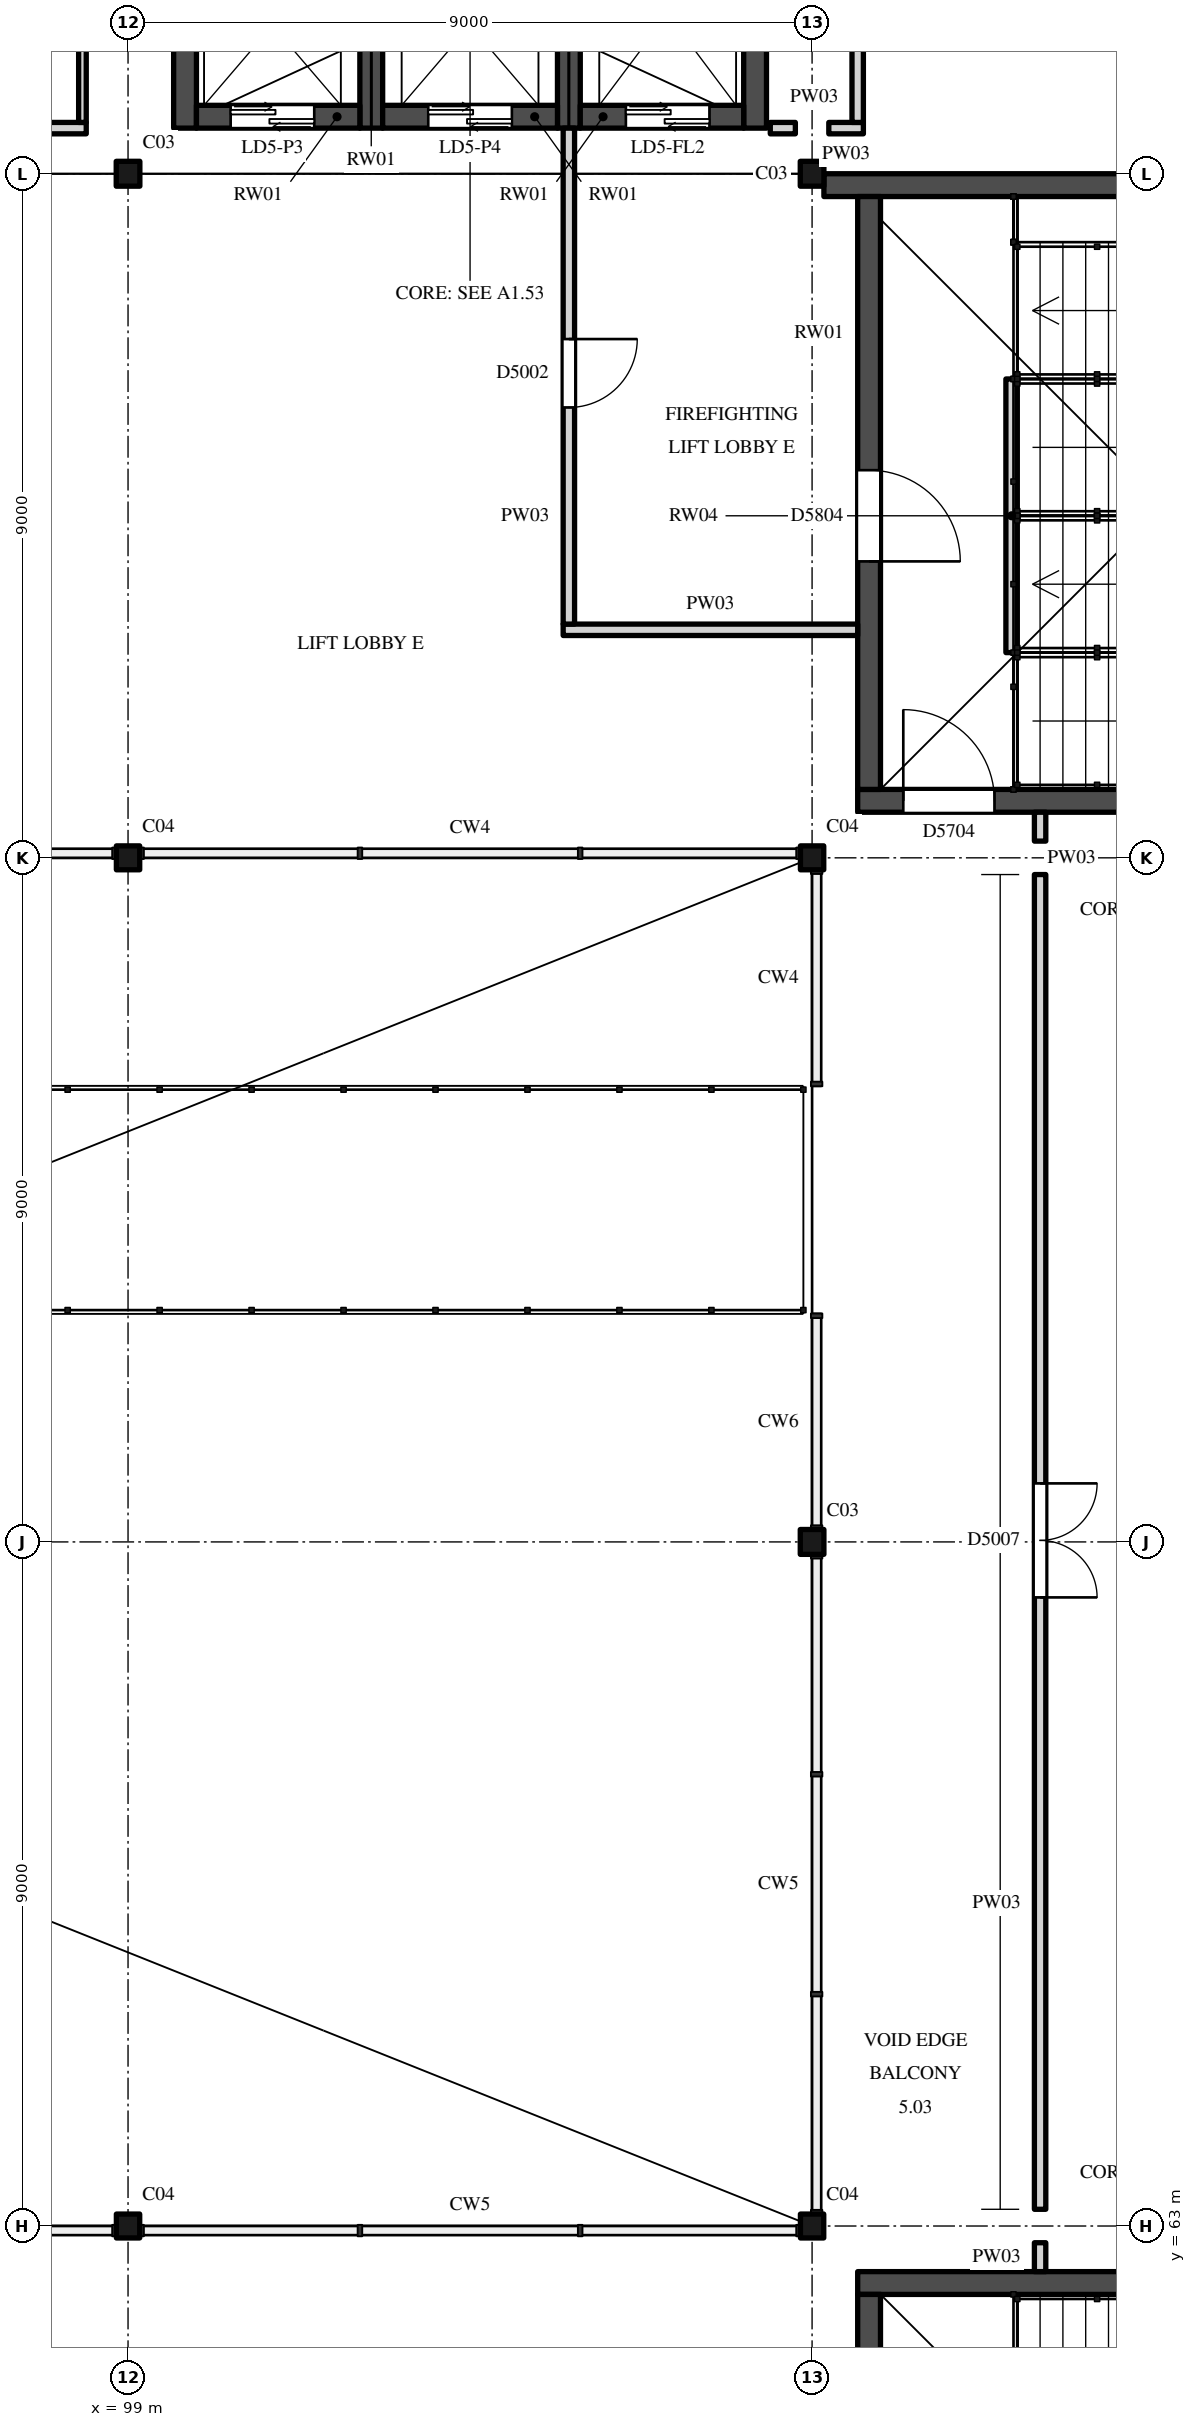
"""IFC4 building model, lengths in metres.
Left out: names, types, materials, properties, quantities, classifications, styles, units other than length and angle.
Written with IfcOpenShell. Run it as: python <this file> out.ifc"""

import sys

from ifc_helpers import new_model, si_unit, direction, frame, frame_2d, origin, origin_2d, place, context, subcontext, project, spatial, rectangle, i_section, extrude, element, fill, save


model = new_model("IFC4")
c1 = context("Model", 3, precision=1e-05, world=origin(), true_north=direction((0.0, 1.0)))
c2 = subcontext(c1, "Body", "Model", "MODEL_VIEW")
j1 = project(units=[si_unit("LENGTHUNIT", "METRE"), si_unit("PLANEANGLEUNIT", "RADIAN")], contexts=[c1])
p1 = place(None, origin())
s1 = spatial("IfcSite", under=j1, at=p1, CompositionType="ELEMENT")
p2 = place(p1, origin())
s2 = spatial("IfcBuilding", under=s1, at=p2, CompositionType="ELEMENT")
p3 = place(p2, frame((0.0, 0.0, 31.0)))
s3 = spatial("IfcBuildingStorey", under=s2, at=p3, CompositionType="ELEMENT", Elevation=31.0)
for number, where, z_axis, x_axis in (
    (1, (99.0, 63.0, 0.0), (0.0, 0.0, 1.0), (1.0, 0.0, 0.0)),
    (2, (108.0, 63.0, 0.0), (0.0, 0.0, 1.0), (1.0, 0.0, 0.0)),
):
    element("IfcColumn", number, at=place(p3, frame(where, z_axis=z_axis, x_axis=x_axis)), inside=s3, PredefinedType="COLUMN", context=c2, shape_type="SweptSolid", body=[
        extrude(i_section(OverallWidth=0.307, OverallDepth=0.315, WebThickness=0.012, FlangeThickness=0.019, FilletRadius=0.017, at=origin_2d()), origin(), (0.0, 0.0, 1.0), 5.0),
    ])
p4 = place(p3, frame((108.0, 72.0, 0.0), z_axis=(0.0, 0.0, 1.0), x_axis=(1.0, 0.0, 0.0)))
e3 = element("IfcColumn", 3, at=p4, inside=s3, PredefinedType="COLUMN", context=c2, shape_type="SweptSolid", body=[
    extrude(i_section(OverallWidth=0.311, OverallDepth=0.327, WebThickness=0.016, FlangeThickness=0.025, FilletRadius=0.017, at=origin_2d()), origin(), (0.0, 0.0, 1.0), 5.0),
])
for number, where, z_axis, x_axis in (
    (4, (99.0, 81.0, 0.0), (0.0, 0.0, 1.0), (1.0, 0.0, 0.0)),
    (5, (108.0, 81.0, 0.0), (0.0, 0.0, 1.0), (1.0, 0.0, 0.0)),
):
    element("IfcColumn", number, at=place(p3, frame(where, z_axis=z_axis, x_axis=x_axis)), inside=s3, PredefinedType="COLUMN", context=c2, shape_type="SweptSolid", body=[
        extrude(i_section(OverallWidth=0.307, OverallDepth=0.315, WebThickness=0.012, FlangeThickness=0.019, FilletRadius=0.017, at=origin_2d()), origin(), (0.0, 0.0, 1.0), 5.0),
    ])
for number, where, z_axis, x_axis in (
    (6, (99.0, 90.0, 0.0), (0.0, 0.0, 1.0), (1.0, 0.0, 0.0)),
    (7, (108.0, 90.0, 0.0), (0.0, 0.0, 1.0), (1.0, 0.0, 0.0)),
):
    element("IfcColumn", number, at=place(p3, frame(where, z_axis=z_axis, x_axis=x_axis)), inside=s3, PredefinedType="COLUMN", context=c2, shape_type="SweptSolid", body=[
        extrude(i_section(OverallWidth=0.311, OverallDepth=0.327, WebThickness=0.016, FlangeThickness=0.025, FilletRadius=0.017, at=origin_2d()), origin(), (0.0, 0.0, 1.0), 5.0),
    ])
p5 = place(p3, frame((108.6, 62.25, 0.0), z_axis=(0.0, 0.0, 1.0), x_axis=(1.0, 0.0, 0.0)))
e8 = element("IfcWall", 8, at=p5, inside=s3, PredefinedType="SHEAR", context=c2, shape_type="SweptSolid", body=[
    extrude(rectangle(XDim=8.1, YDim=0.3, at=frame_2d((4.05, 0.0))), origin(), (0.0, 0.0, 1.0), 5.0),
])
p6 = place(p3, frame((108.75, 54.3, 0.0), z_axis=(0.0, 0.0, 1.0), x_axis=(0.0, 1.0, 0.0)))
e9 = element("IfcWall", 9, at=p6, inside=s3, PredefinedType="SHEAR", context=c2, shape_type="SweptSolid", body=[
    extrude(rectangle(XDim=7.8, YDim=0.3, at=frame_2d((3.9, 0.0))), origin(), (0.0, 0.0, 1.0), 5.0),
])
p7 = place(p6, frame((3.6, 0.0, 0.0)))
e10 = element("IfcOpeningElement", 10, at=p7, cuts=e9, PredefinedType="OPENING", context=c2, shape_type="SweptSolid", body=[
    extrude(rectangle(XDim=1.2, YDim=2.1, at=frame_2d((0.6, 1.05))), frame((0.0, 0.16, 0.0), z_axis=(0.0, -1.0, 0.0), x_axis=(1.0, 0.0, 0.0)), (0.0, 0.0, 1.0), 0.32),
])
p8 = place(p3, frame((108.6, 81.75, 0.0), z_axis=(0.0, 0.0, 1.0), x_axis=(1.0, 0.0, 0.0)))
e11 = element("IfcWall", 11, at=p8, inside=s3, PredefinedType="SHEAR", context=c2, shape_type="SweptSolid", body=[
    extrude(rectangle(XDim=8.1, YDim=0.3, at=frame_2d((4.05, 0.0))), origin(), (0.0, 0.0, 1.0), 5.0),
])
p9 = place(p8, frame((0.6, 0.0, 0.0)))
e12 = element("IfcOpeningElement", 12, at=p9, cuts=e11, PredefinedType="OPENING", context=c2, shape_type="SweptSolid", body=[
    extrude(rectangle(XDim=1.2, YDim=2.1, at=frame_2d((0.6, 1.05))), frame((0.0, 0.16, 0.0), z_axis=(0.0, -1.0, 0.0), x_axis=(1.0, 0.0, 0.0)), (0.0, 0.0, 1.0), 0.32),
])
p10 = place(p3, frame((108.156, 89.85, 0.0), z_axis=(0.0, 0.0, 1.0), x_axis=(1.0, 0.0, 0.0)))
e13 = element("IfcWall", 13, at=p10, inside=s3, PredefinedType="SHEAR", context=c2, shape_type="SweptSolid", body=[
    extrude(rectangle(XDim=8.544, YDim=0.3, at=frame_2d((4.272, 0.0))), origin(), (0.0, 0.0, 1.0), 5.0),
])
p11 = place(p3, frame((108.75, 81.9, 0.0), z_axis=(0.0, 0.0, 1.0), x_axis=(0.0, 1.0, 0.0)))
e14 = element("IfcWall", 14, at=p11, inside=s3, PredefinedType="SHEAR", context=c2, shape_type="SweptSolid", body=[
    extrude(rectangle(XDim=7.8, YDim=0.3, at=frame_2d((3.9, 0.0))), origin(), (0.0, 0.0, 1.0), 5.0),
])
p12 = place(p11, frame((3.0, 0.0, 0.0)))
e15 = element("IfcOpeningElement", 15, at=p12, cuts=e14, PredefinedType="OPENING", context=c2, shape_type="SweptSolid", body=[
    extrude(rectangle(XDim=1.2, YDim=2.1, at=frame_2d((0.6, 1.05))), frame((0.0, 0.16, 0.0), z_axis=(0.0, -1.0, 0.0), x_axis=(1.0, 0.0, 0.0)), (0.0, 0.0, 1.0), 0.32),
])
p13 = place(p3, frame((110.625, 83.7, 0.0), z_axis=(0.0, 0.0, 1.0), x_axis=(0.0, 1.0, 0.0)))
e16 = element("IfcWall", 16, at=p13, inside=s3, PredefinedType="STANDARD", context=c2, shape_type="SweptSolid", body=[
    extrude(rectangle(XDim=3.6, YDim=0.15, at=frame_2d((1.8, 0.0))), origin(), (0.0, 0.0, 1.0), 2.3),
])
for number, where, z_axis, x_axis in (
    (17, (99.75, 90.6, 0.0), (0.0, 0.0, 1.0), (0.0, 1.0, 0.0)),
    (18, (102.2, 90.6, 0.0), (0.0, 0.0, 1.0), (0.0, 1.0, 0.0)),
    (19, (104.8, 90.6, 0.0), (0.0, 0.0, 1.0), (0.0, 1.0, 0.0)),
    (20, (107.25, 90.6, 0.0), (0.0, 0.0, 1.0), (0.0, 1.0, 0.0)),
):
    element("IfcWall", number, at=place(p3, frame(where, z_axis=z_axis, x_axis=x_axis)), inside=s3, PredefinedType="SHEAR", context=c2, shape_type="SweptSolid", body=[
        extrude(rectangle(XDim=3.6, YDim=0.3, at=frame_2d((1.8, 0.0))), origin(), (0.0, 0.0, 1.0), 5.0),
    ])
p14 = place(p3, frame((99.9, 90.75, 0.0), z_axis=(0.0, 0.0, 1.0), x_axis=(1.0, 0.0, 0.0)))
e21 = element("IfcWall", 21, at=p14, inside=s3, PredefinedType="SHEAR", context=c2, shape_type="SweptSolid", body=[
    extrude(rectangle(XDim=2.15, YDim=0.3, at=frame_2d((1.075, 0.0))), origin(), (0.0, 0.0, 1.0), 5.0),
])
p15 = place(p14, frame((0.45, 0.0, 0.0)))
e22 = element("IfcOpeningElement", 22, at=p15, cuts=e21, PredefinedType="OPENING", context=c2, shape_type="SweptSolid", body=[
    extrude(rectangle(XDim=1.1, YDim=2.1, at=frame_2d((0.55, 1.05))), frame((0.0, 0.16, 0.0), z_axis=(0.0, -1.0, 0.0), x_axis=(1.0, 0.0, 0.0)), (0.0, 0.0, 1.0), 0.32),
])
p16 = place(p3, frame((102.35, 90.75, 0.0), z_axis=(0.0, 0.0, 1.0), x_axis=(1.0, 0.0, 0.0)))
e23 = element("IfcWall", 23, at=p16, inside=s3, PredefinedType="SHEAR", context=c2, shape_type="SweptSolid", body=[
    extrude(rectangle(XDim=2.3, YDim=0.3, at=frame_2d((1.15, 0.0))), origin(), (0.0, 0.0, 1.0), 5.0),
])
p17 = place(p16, frame((0.6, 0.0, 0.0)))
e24 = element("IfcOpeningElement", 24, at=p17, cuts=e23, PredefinedType="OPENING", context=c2, shape_type="SweptSolid", body=[
    extrude(rectangle(XDim=1.1, YDim=2.1, at=frame_2d((0.55, 1.05))), frame((0.0, 0.16, 0.0), z_axis=(0.0, -1.0, 0.0), x_axis=(1.0, 0.0, 0.0)), (0.0, 0.0, 1.0), 0.32),
])
p18 = place(p3, frame((104.95, 90.75, 0.0), z_axis=(0.0, 0.0, 1.0), x_axis=(1.0, 0.0, 0.0)))
e25 = element("IfcWall", 25, at=p18, inside=s3, PredefinedType="SHEAR", context=c2, shape_type="SweptSolid", body=[
    extrude(rectangle(XDim=2.15, YDim=0.3, at=frame_2d((1.075, 0.0))), origin(), (0.0, 0.0, 1.0), 5.0),
])
p19 = place(p18, frame((0.6, 0.0, 0.0)))
e26 = element("IfcOpeningElement", 26, at=p19, cuts=e25, PredefinedType="OPENING", context=c2, shape_type="SweptSolid", body=[
    extrude(rectangle(XDim=1.1, YDim=2.1, at=frame_2d((0.55, 1.05))), frame((0.0, 0.16, 0.0), z_axis=(0.0, -1.0, 0.0), x_axis=(1.0, 0.0, 0.0)), (0.0, 0.0, 1.0), 0.32),
])
p20 = place(p3, frame((104.725, 84.0, 0.0), z_axis=(0.0, 0.0, 1.0), x_axis=(1.0, 0.0, 0.0)))
e27 = element("IfcWall", 27, at=p20, inside=s3, PredefinedType="PARTITIONING", context=c2, shape_type="SweptSolid", body=[
    extrude(rectangle(XDim=3.875, YDim=0.15, at=frame_2d((1.938, 0.0))), origin(), (0.0, 0.0, 1.0), 4.521),
])
p21 = place(p3, frame((90.55, 90.6, 0.0), z_axis=(0.0, 0.0, 1.0), x_axis=(1.0, 0.0, 0.0)))
e28 = element("IfcWall", 28, at=p21, inside=s3, PredefinedType="PARTITIONING", context=c2, shape_type="SweptSolid", body=[
    extrude(rectangle(XDim=7.9, YDim=0.15, at=frame_2d((3.95, 0.0))), origin(), (0.0, 0.0, 1.0), 4.825),
])
p22 = place(p21, frame((3.2, 0.0, 0.0)))
e29 = element("IfcOpeningElement", 29, at=p22, cuts=e28, PredefinedType="OPENING", context=c2, shape_type="SweptSolid", body=[
    extrude(rectangle(XDim=1.5, YDim=2.4, at=frame_2d((0.75, 1.2))), frame((0.0, 0.085, 0.0), z_axis=(0.0, -1.0, 0.0), x_axis=(1.0, 0.0, 0.0)), (0.0, 0.0, 1.0), 0.17),
])
p23 = place(p3, frame((107.45, 90.6, 0.0), z_axis=(0.0, 0.0, 1.0), x_axis=(1.0, 0.0, 0.0)))
e30 = element("IfcWall", 30, at=p23, inside=s3, PredefinedType="PARTITIONING", context=c2, shape_type="SweptSolid", body=[
    extrude(rectangle(XDim=0.33, YDim=0.15, at=frame_2d((0.165, 0.0))), origin(), (0.0, 0.0, 1.0), 4.825),
])
p24 = place(p3, frame((108.22, 90.6, 0.0), z_axis=(0.0, 0.0, 1.0), x_axis=(1.0, 0.0, 0.0)))
e31 = element("IfcWall", 31, at=p24, inside=s3, PredefinedType="PARTITIONING", context=c2, shape_type="SweptSolid", body=[
    extrude(rectangle(XDim=0.455, YDim=0.15, at=frame_2d((0.228, 0.0))), origin(), (0.0, 0.0, 1.0), 4.825),
])
p25 = place(p3, frame((98.4, 90.675, 0.0), z_axis=(0.0, 0.0, 1.0), x_axis=(0.0, 1.0, 0.0)))
e32 = element("IfcWall", 32, at=p25, inside=s3, PredefinedType="PARTITIONING", context=c2, shape_type="SweptSolid", body=[
    extrude(rectangle(XDim=12.75, YDim=0.1, at=frame_2d((6.375, 0.0))), origin(), (0.0, 0.0, 1.0), 4.825),
])
p26 = place(p3, frame((104.8, 84.075, 0.0), z_axis=(0.0, 0.0, 1.0), x_axis=(0.0, 1.0, 0.0)))
e33 = element("IfcWall", 33, at=p26, inside=s3, PredefinedType="PARTITIONING", context=c2, shape_type="SweptSolid", body=[
    extrude(rectangle(XDim=6.525, YDim=0.15, at=frame_2d((3.263, 0.0))), origin(), (0.0, 0.0, 1.0), 4.825),
])
p27 = place(p26, frame((2.85, 0.0, 0.0)))
e34 = element("IfcOpeningElement", 34, at=p27, cuts=e33, PredefinedType="OPENING", context=c2, shape_type="SweptSolid", body=[
    extrude(rectangle(XDim=0.9, YDim=2.1, at=frame_2d((0.45, 1.05))), frame((0.0, 0.085, 0.0), z_axis=(0.0, -1.0, 0.0), x_axis=(1.0, 0.0, 0.0)), (0.0, 0.0, 1.0), 0.17),
])
p28 = place(p3, frame((108.6, 90.675, 0.0), z_axis=(0.0, 0.0, 1.0), x_axis=(0.0, 1.0, 0.0)))
e35 = element("IfcWall", 35, at=p28, inside=s3, PredefinedType="PARTITIONING", context=c2, shape_type="SweptSolid", body=[
    extrude(rectangle(XDim=3.45, YDim=0.15, at=frame_2d((1.725, 0.0))), origin(), (0.0, 0.0, 1.0), 4.825),
])
p29 = place(p3, frame((111.0, 62.4, 0.0), z_axis=(0.0, 0.0, 1.0), x_axis=(0.0, 1.0, 0.0)))
e36 = element("IfcWall", 36, at=p29, inside=s3, PredefinedType="PARTITIONING", context=c2, shape_type="SweptSolid", body=[
    extrude(rectangle(XDim=0.38, YDim=0.15, at=frame_2d((0.19, 0.0))), origin(), (0.0, 0.0, 1.0), 4.825),
])
p30 = place(p3, frame((111.0, 63.22, 0.0), z_axis=(0.0, 0.0, 1.0), x_axis=(0.0, 1.0, 0.0)))
e37 = element("IfcWall", 37, at=p30, inside=s3, PredefinedType="PARTITIONING", context=c2, shape_type="SweptSolid", body=[
    extrude(rectangle(XDim=17.56, YDim=0.15, at=frame_2d((8.78, 0.0))), origin(), (0.0, 0.0, 1.0), 4.825),
])
p31 = place(p30, frame((8.05, 0.0, 0.0)))
e38 = element("IfcOpeningElement", 38, at=p31, cuts=e37, PredefinedType="OPENING", context=c2, shape_type="SweptSolid", body=[
    extrude(rectangle(XDim=1.5, YDim=2.4, at=frame_2d((0.75, 1.2))), frame((0.0, 0.085, 0.0), z_axis=(0.0, -1.0, 0.0), x_axis=(1.0, 0.0, 0.0)), (0.0, 0.0, 1.0), 0.17),
])
p32 = place(p3, frame((111.0, 81.22, 0.0), z_axis=(0.0, 0.0, 1.0), x_axis=(0.0, 1.0, 0.0)))
e39 = element("IfcWall", 39, at=p32, inside=s3, PredefinedType="PARTITIONING", context=c2, shape_type="SweptSolid", body=[
    extrude(rectangle(XDim=0.38, YDim=0.15, at=frame_2d((0.19, 0.0))), origin(), (0.0, 0.0, 1.0), 4.825),
])
p33 = place(p12, origin())
e40 = element("IfcDoor", 40, at=p33, inside=s3, OperationType="SINGLE_SWING_LEFT", PredefinedType="DOOR", context=c2, shape_type="SweptSolid", body=[
    extrude(rectangle(XDim=1.2, YDim=2.1, at=frame_2d((0.6, 1.05))), frame((0.0, 0.025, 0.0), z_axis=(0.0, -1.0, 0.0), x_axis=(1.0, 0.0, 0.0)), (0.0, 0.0, 1.0), 0.05),
])
fill(e15, e40)
p34 = place(p9, origin())
e41 = element("IfcDoor", 41, at=p34, inside=s3, OperationType="SINGLE_SWING_RIGHT", PredefinedType="DOOR", context=c2, shape_type="SweptSolid", body=[
    extrude(rectangle(XDim=1.2, YDim=2.1, at=frame_2d((0.6, 1.05))), frame((0.0, 0.025, 0.0), z_axis=(0.0, -1.0, 0.0), x_axis=(1.0, 0.0, 0.0)), (0.0, 0.0, 1.0), 0.05),
])
fill(e12, e41)
p35 = place(p15, origin())
e42 = element("IfcDoor", 42, at=p35, inside=s3, OperationType="DOUBLE_DOOR_SLIDING", PredefinedType="DOOR", context=c2, shape_type="SweptSolid", body=[
    extrude(rectangle(XDim=1.1, YDim=2.1, at=frame_2d((0.55, 1.05))), frame((0.0, 0.025, 0.0), z_axis=(0.0, -1.0, 0.0), x_axis=(1.0, 0.0, 0.0)), (0.0, 0.0, 1.0), 0.05),
])
fill(e22, e42)
p36 = place(p17, origin())
e43 = element("IfcDoor", 43, at=p36, inside=s3, OperationType="DOUBLE_DOOR_SLIDING", PredefinedType="DOOR", context=c2, shape_type="SweptSolid", body=[
    extrude(rectangle(XDim=1.1, YDim=2.1, at=frame_2d((0.55, 1.05))), frame((0.0, 0.025, 0.0), z_axis=(0.0, -1.0, 0.0), x_axis=(1.0, 0.0, 0.0)), (0.0, 0.0, 1.0), 0.05),
])
fill(e24, e43)
p37 = place(p19, origin())
e44 = element("IfcDoor", 44, at=p37, inside=s3, OperationType="DOUBLE_DOOR_SLIDING", PredefinedType="DOOR", context=c2, shape_type="SweptSolid", body=[
    extrude(rectangle(XDim=1.1, YDim=2.1, at=frame_2d((0.55, 1.05))), frame((0.0, 0.025, 0.0), z_axis=(0.0, -1.0, 0.0), x_axis=(1.0, 0.0, 0.0)), (0.0, 0.0, 1.0), 0.05),
])
fill(e26, e44)
p38 = place(p27, origin())
e45 = element("IfcDoor", 45, at=p38, inside=s3, OperationType="SINGLE_SWING_RIGHT", PredefinedType="DOOR", context=c2, shape_type="SweptSolid", body=[
    extrude(rectangle(XDim=0.9, YDim=2.1, at=frame_2d((0.45, 1.05))), frame((0.0, 0.025, 0.0), z_axis=(0.0, -1.0, 0.0), x_axis=(1.0, 0.0, 0.0)), (0.0, 0.0, 1.0), 0.05),
])
fill(e34, e45)
p39 = place(p31, origin())
e46 = element("IfcDoor", 46, at=p39, inside=s3, OperationType="DOUBLE_DOOR_SINGLE_SWING", PredefinedType="DOOR", context=c2, shape_type="SweptSolid", body=[
    extrude(rectangle(XDim=1.5, YDim=2.4, at=frame_2d((0.75, 1.2))), frame((0.0, 0.025, 0.0), z_axis=(0.0, -1.0, 0.0), x_axis=(1.0, 0.0, 0.0)), (0.0, 0.0, 1.0), 0.05),
])
fill(e38, e46)
save(model, sys.argv[1])
